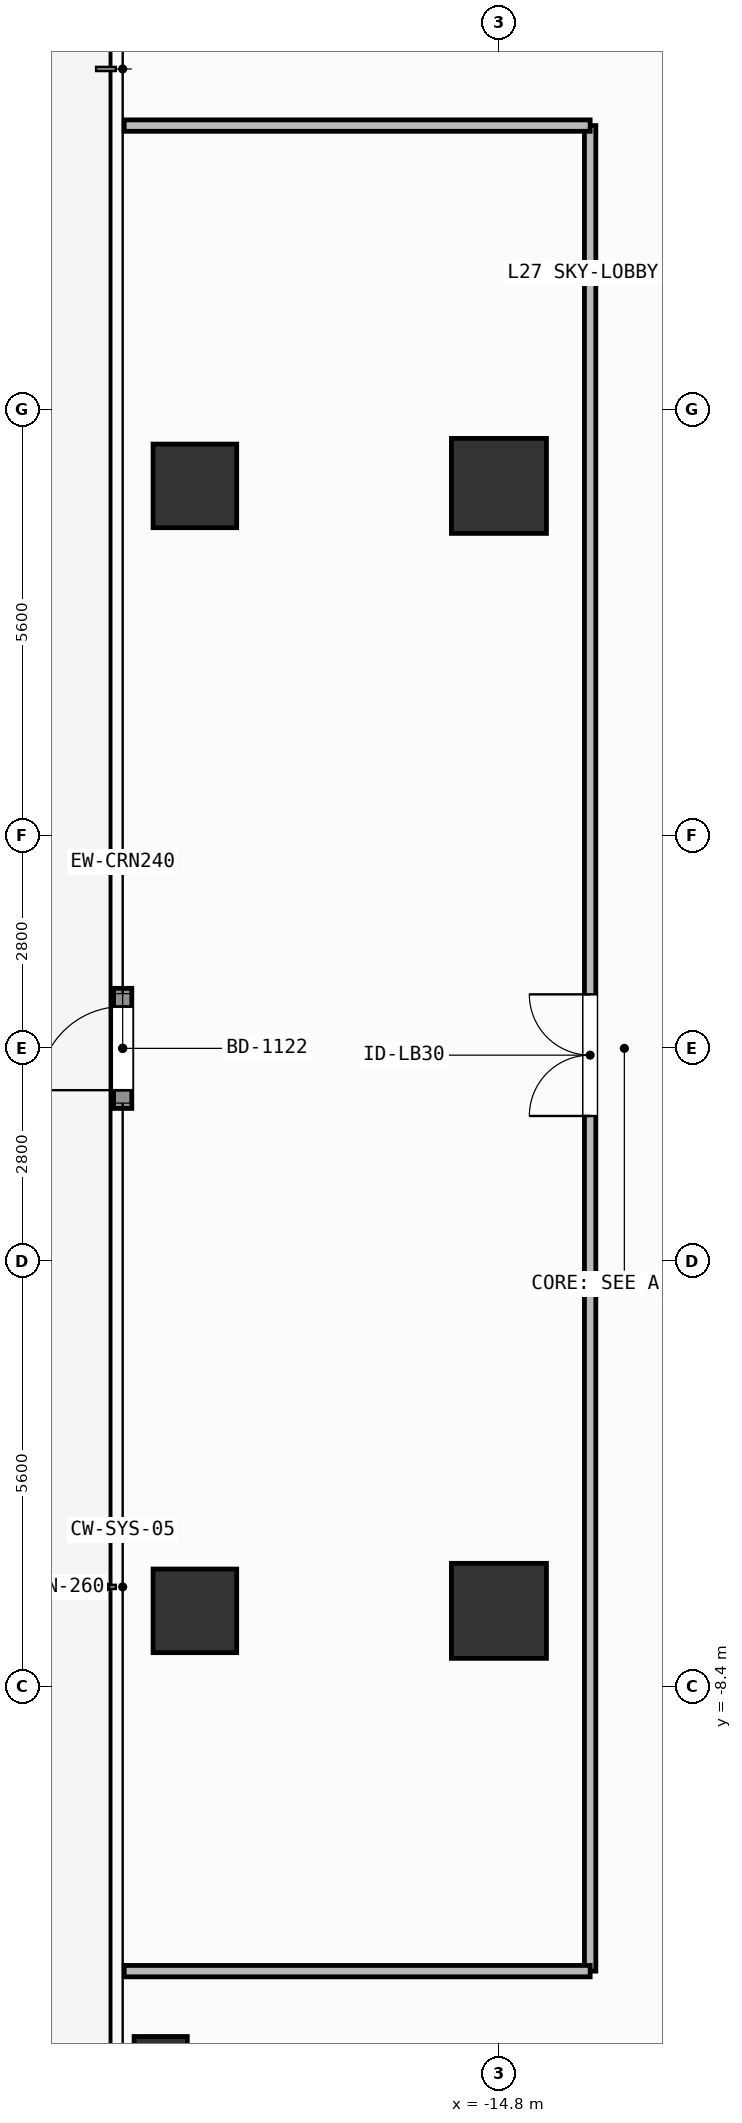
"""IFC4 building model, lengths in metres.
Left out: names, types, materials, properties, quantities, classifications, styles, units other than length and angle.
Written with IfcOpenShell. Run it as: python <this file> out.ifc"""

import sys

from ifc_helpers import new_model, si_unit, direction, frame, frame_2d, origin, origin_2d, place, context, subcontext, project, spatial, rectangle, hollow_rectangle, extrude, element, fill, save


model = new_model("IFC4")
c1 = context("Model", 3, precision=1e-05, world=origin(), true_north=direction((0.0, 1.0)))
c2 = subcontext(c1, "Body", "Model", "MODEL_VIEW")
j1 = project(units=[si_unit("LENGTHUNIT", "METRE"), si_unit("PLANEANGLEUNIT", "RADIAN")], contexts=[c1])
p1 = place(None, origin())
s1 = spatial("IfcSite", under=j1, at=p1, CompositionType="ELEMENT")
p2 = place(p1, origin())
s2 = spatial("IfcBuilding", under=s1, at=p2, CompositionType="ELEMENT")
p3 = place(p2, frame((0.0, 0.0, 108.6)))
s3 = spatial("IfcBuildingStorey", under=s2, at=p3, CompositionType="ELEMENT", Elevation=108.6)
for number, where, z_axis, x_axis in (
    (1, (-14.8, -7.4, 0.0), (0.0, 0.0, 1.0), (1.0, 0.0, 0.0)),
    (2, (-14.8, 7.4, 0.0), (0.0, 0.0, 1.0), (1.0, 0.0, 0.0)),
):
    element("IfcColumn", number, at=place(p3, frame(where, z_axis=z_axis, x_axis=x_axis)), inside=s3, PredefinedType="COLUMN", context=c2, shape_type="SweptSolid", body=[
        extrude(rectangle(XDim=1.25, YDim=1.25, at=origin_2d()), origin(), (0.0, 0.0, 1.0), 4.8),
    ])
for number, where, z_axis, x_axis in (
    (3, (-18.8, -7.4, 0.0), (0.0, 0.0, 1.0), (1.0, 0.0, 0.0)),
    (4, (-18.8, 7.4, 0.0), (0.0, 0.0, 1.0), (1.0, 0.0, 0.0)),
):
    element("IfcColumn", number, at=place(p3, frame(where, z_axis=z_axis, x_axis=x_axis)), inside=s3, PredefinedType="COLUMN", context=c2, shape_type="SweptSolid", body=[
        extrude(rectangle(XDim=1.1, YDim=1.1, at=origin_2d()), origin(), (0.0, 0.0, 1.0), 4.8),
    ])
p4 = place(p3, frame((-19.25, -13.35, 0.0), z_axis=(0.0, 0.0, 1.0), x_axis=(1.0, 0.0, 0.0)))
e5 = element("IfcColumn", 5, at=p4, inside=s3, PredefinedType="COLUMN", context=c2, shape_type="SweptSolid", body=[
    extrude(hollow_rectangle(XDim=0.7, YDim=0.7, WallThickness=0.032, at=origin_2d()), origin(), (0.0, 0.0, 1.0), 4.8),
])
p5 = place(p3, frame((-19.75, -0.79, 0.0), z_axis=(0.0, 0.0, 1.0), x_axis=(0.0, 1.0, 0.0)))
e6 = element("IfcWall", 6, at=p5, inside=s3, PredefinedType="SOLIDWALL", context=c2, shape_type="SweptSolid", body=[
    extrude(rectangle(XDim=1.58, YDim=0.24, at=frame_2d((0.79, 0.0))), origin(), (0.0, 0.0, 1.0), 4.58),
])
p6 = place(p5, frame((0.24, 0.0, 0.0)))
e7 = element("IfcOpeningElement", 7, at=p6, cuts=e6, PredefinedType="OPENING", context=c2, shape_type="SweptSolid", body=[
    extrude(rectangle(XDim=1.1, YDim=2.2, at=frame_2d((0.55, 1.1))), frame((0.0, 0.13, 0.0), z_axis=(0.0, -1.0, 0.0), x_axis=(1.0, 0.0, 0.0)), (0.0, 0.0, 1.0), 0.26),
])
p7 = place(p3, frame((-13.6, -12.14, 0.0), z_axis=(0.0, 0.0, 1.0), x_axis=(0.0, 1.0, 0.0)))
e8 = element("IfcWall", 8, at=p7, inside=s3, PredefinedType="PARTITIONING", context=c2, shape_type="SweptSolid", body=[
    extrude(rectangle(XDim=24.28, YDim=0.15, at=frame_2d((12.14, 0.0))), origin(), (0.0, 0.0, 1.0), 4.58),
])
p8 = place(p7, frame((11.25, 0.0, 0.0)))
e9 = element("IfcOpeningElement", 9, at=p8, cuts=e8, PredefinedType="OPENING", context=c2, shape_type="SweptSolid", body=[
    extrude(rectangle(XDim=1.6, YDim=2.3, at=frame_2d((0.8, 1.15))), frame((0.0, 0.085, 0.0), z_axis=(0.0, -1.0, 0.0), x_axis=(1.0, 0.0, 0.0)), (0.0, 0.0, 1.0), 0.17),
])
for number, where, z_axis, x_axis in (
    (10, (-19.73, -12.14, 0.0), (0.0, 0.0, 1.0), (1.0, 0.0, 0.0)),
    (11, (-19.73, 12.14, 0.0), (0.0, 0.0, 1.0), (1.0, 0.0, 0.0)),
):
    element("IfcWall", number, at=place(p3, frame(where, z_axis=z_axis, x_axis=x_axis)), inside=s3, PredefinedType="PARTITIONING", context=c2, shape_type="SweptSolid", body=[
        extrude(rectangle(XDim=6.13, YDim=0.15, at=frame_2d((3.065, 0.0))), origin(), (0.0, 0.0, 1.0), 4.58),
    ])
p9 = place(p6, origin())
e12 = element("IfcDoor", 12, at=p9, inside=s3, OperationType="SINGLE_SWING_LEFT", PredefinedType="DOOR", context=c2, shape_type="SweptSolid", body=[
    extrude(rectangle(XDim=1.1, YDim=2.2, at=frame_2d((0.55, 1.1))), frame((0.0, 0.025, 0.0), z_axis=(0.0, -1.0, 0.0), x_axis=(1.0, 0.0, 0.0)), (0.0, 0.0, 1.0), 0.05),
])
fill(e7, e12)
p10 = place(p8, origin())
e13 = element("IfcDoor", 13, at=p10, inside=s3, OperationType="SINGLE_SWING_LEFT", PredefinedType="DOOR", context=c2, shape_type="SweptSolid", body=[
    extrude(rectangle(XDim=1.6, YDim=2.3, at=frame_2d((0.8, 1.15))), frame((0.0, 0.025, 0.0), z_axis=(0.0, -1.0, 0.0), x_axis=(1.0, 0.0, 0.0)), (0.0, 0.0, 1.0), 0.05),
])
fill(e9, e13)
save(model, sys.argv[1])
